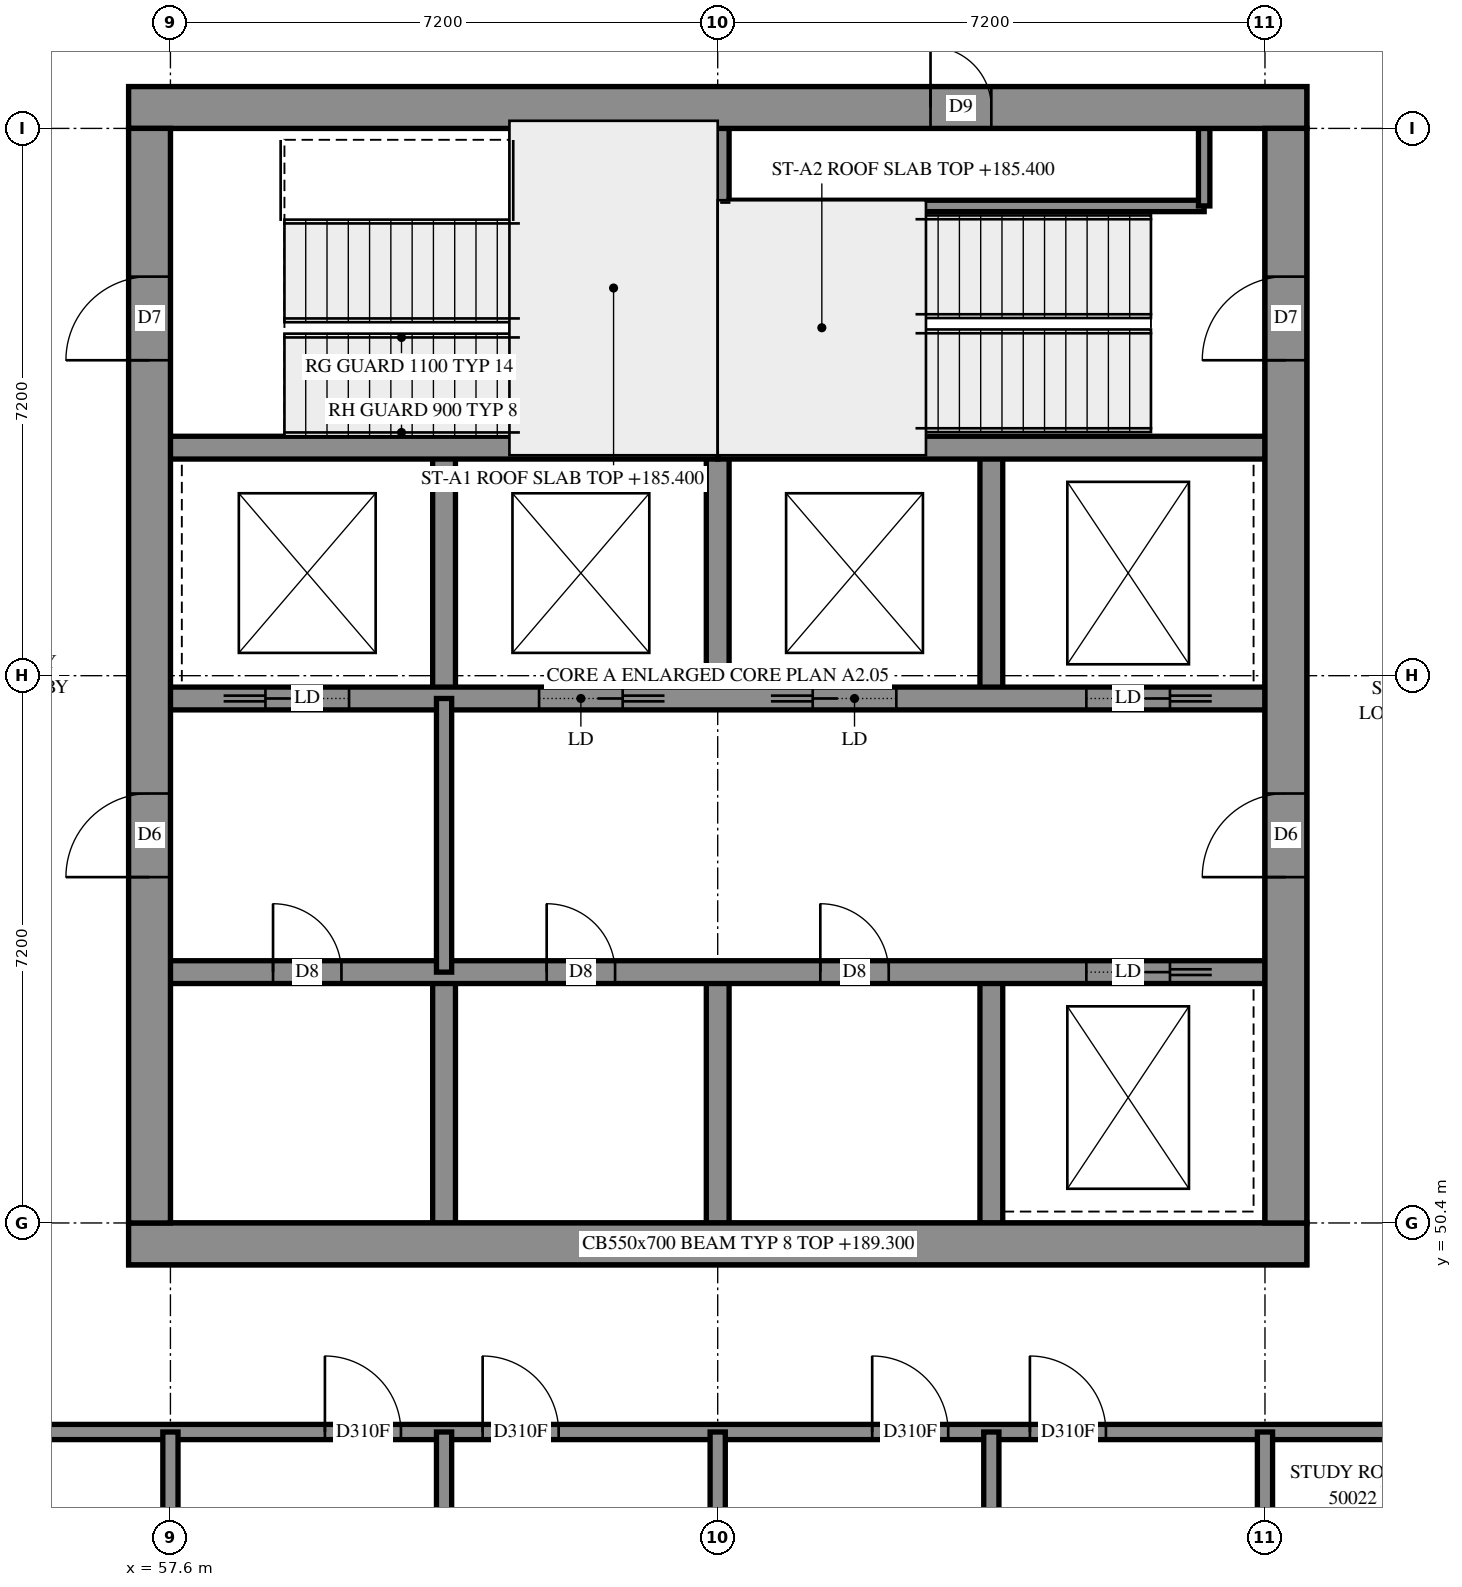
"""IFC4 building model, lengths in metres.
Left out: names, types, materials, properties, quantities, classifications, styles, units other than length and angle.
Written with IfcOpenShell. Run it as: python <this file> out.ifc"""

import sys

from ifc_helpers import new_model, si_unit, direction, frame, frame_2d, origin, place, context, subcontext, project, spatial, rectangle, extrude, element, fill, save


model = new_model("IFC4")
c1 = context("Model", 3, precision=1e-05, world=origin(), true_north=direction((0.0, 1.0)))
c2 = subcontext(c1, "Body", "Model", "MODEL_VIEW")
j1 = project(units=[si_unit("LENGTHUNIT", "METRE"), si_unit("PLANEANGLEUNIT", "RADIAN")], contexts=[c1])
p1 = place(None, origin())
s1 = spatial("IfcSite", under=j1, at=p1, CompositionType="ELEMENT")
p2 = place(p1, origin())
s2 = spatial("IfcBuilding", under=s1, at=p2, CompositionType="ELEMENT")
p3 = place(p2, frame((0.0, 0.0, 185.4)))
s3 = spatial("IfcBuildingStorey", under=s2, at=p3, CompositionType="ELEMENT", Elevation=185.4)
p4 = place(p3, frame((57.05, 50.125, -0.3), z_axis=(0.0, 0.0, 1.0), x_axis=(1.0, 0.0, 0.0)))
e1 = element("IfcWall", 1, at=p4, inside=s3, PredefinedType="SHEAR", context=c2, shape_type="SweptSolid", body=[
    extrude(rectangle(XDim=15.5, YDim=0.55, at=frame_2d((7.75, 0.0))), origin(), (0.0, 0.0, 1.0), 3.5),
])
p5 = place(p3, frame((57.05, 65.075, -0.3), z_axis=(0.0, 0.0, 1.0), x_axis=(1.0, 0.0, 0.0)))
e2 = element("IfcWall", 2, at=p5, inside=s3, PredefinedType="SHEAR", context=c2, shape_type="SweptSolid", body=[
    extrude(rectangle(XDim=15.5, YDim=0.55, at=frame_2d((7.75, 0.0))), origin(), (0.0, 0.0, 1.0), 3.5),
])
p6 = place(p5, frame((10.55, 0.0, 0.3)))
e3 = element("IfcOpeningElement", 3, at=p6, cuts=e2, PredefinedType="OPENING", context=c2, shape_type="SweptSolid", body=[
    extrude(rectangle(XDim=0.8, YDim=2.1, at=frame_2d((0.4, 1.05))), frame((0.0, 0.285, 0.0), z_axis=(0.0, -1.0, 0.0), x_axis=(1.0, 0.0, 0.0)), (0.0, 0.0, 1.0), 0.57),
])
p7 = place(p3, frame((57.325, 50.4, -0.3), z_axis=(0.0, 0.0, 1.0), x_axis=(0.0, 1.0, 0.0)))
e4 = element("IfcWall", 4, at=p7, inside=s3, PredefinedType="SHEAR", context=c2, shape_type="SweptSolid", body=[
    extrude(rectangle(XDim=14.4, YDim=0.55, at=frame_2d((7.2, 0.0))), origin(), (0.0, 0.0, 1.0), 3.5),
])
p8 = place(p7, frame((4.55, 0.0, 0.3)))
e5 = element("IfcOpeningElement", 5, at=p8, cuts=e4, PredefinedType="OPENING", context=c2, shape_type="SweptSolid", body=[
    extrude(rectangle(XDim=1.1, YDim=2.1, at=frame_2d((0.55, 1.05))), frame((0.0, 0.285, 0.0), z_axis=(0.0, -1.0, 0.0), x_axis=(1.0, 0.0, 0.0)), (0.0, 0.0, 1.0), 0.57),
])
p9 = place(p7, frame((11.35, 0.0, 0.3)))
e6 = element("IfcOpeningElement", 6, at=p9, cuts=e4, PredefinedType="OPENING", context=c2, shape_type="SweptSolid", body=[
    extrude(rectangle(XDim=1.1, YDim=2.1, at=frame_2d((0.55, 1.05))), frame((0.0, 0.285, 0.0), z_axis=(0.0, -1.0, 0.0), x_axis=(1.0, 0.0, 0.0)), (0.0, 0.0, 1.0), 0.57),
])
p10 = place(p3, frame((72.275, 50.4, -0.3), z_axis=(0.0, 0.0, 1.0), x_axis=(0.0, 1.0, 0.0)))
e7 = element("IfcWall", 7, at=p10, inside=s3, PredefinedType="SHEAR", context=c2, shape_type="SweptSolid", body=[
    extrude(rectangle(XDim=14.4, YDim=0.55, at=frame_2d((7.2, 0.0))), origin(), (0.0, 0.0, 1.0), 3.5),
])
p11 = place(p10, frame((4.55, 0.0, 0.3)))
e8 = element("IfcOpeningElement", 8, at=p11, cuts=e7, PredefinedType="OPENING", context=c2, shape_type="SweptSolid", body=[
    extrude(rectangle(XDim=1.1, YDim=2.1, at=frame_2d((0.55, 1.05))), frame((0.0, 0.285, 0.0), z_axis=(0.0, -1.0, 0.0), x_axis=(1.0, 0.0, 0.0)), (0.0, 0.0, 1.0), 0.57),
])
p12 = place(p10, frame((11.35, 0.0, 0.3)))
e9 = element("IfcOpeningElement", 9, at=p12, cuts=e7, PredefinedType="OPENING", context=c2, shape_type="SweptSolid", body=[
    extrude(rectangle(XDim=1.1, YDim=2.1, at=frame_2d((0.55, 1.05))), frame((0.0, 0.285, 0.0), z_axis=(0.0, -1.0, 0.0), x_axis=(1.0, 0.0, 0.0)), (0.0, 0.0, 1.0), 0.57),
])
for number, where, z_axis, x_axis in (
    (10, (61.2, 50.4, 0.0), (0.0, 0.0, 1.0), (0.0, 1.0, 0.0)),
    (11, (61.2, 57.3, 0.0), (0.0, 0.0, 1.0), (0.0, 1.0, 0.0)),
    (12, (64.8, 50.4, 0.0), (0.0, 0.0, 1.0), (0.0, 1.0, 0.0)),
    (13, (64.8, 57.3, 0.0), (0.0, 0.0, 1.0), (0.0, 1.0, 0.0)),
    (14, (68.4, 50.4, 0.0), (0.0, 0.0, 1.0), (0.0, 1.0, 0.0)),
    (15, (68.4, 57.3, 0.0), (0.0, 0.0, 1.0), (0.0, 1.0, 0.0)),
):
    element("IfcWall", number, at=place(p3, frame(where, z_axis=z_axis, x_axis=x_axis)), inside=s3, PredefinedType="SOLIDWALL", context=c2, shape_type="SweptSolid", body=[
        extrude(rectangle(XDim=3.3, YDim=0.3, at=frame_2d((1.65, 0.0))), origin(), (0.0, 0.0, 1.0), 3.9),
    ])
p13 = place(p3, frame((57.6, 53.7, 0.0), z_axis=(0.0, 0.0, 1.0), x_axis=(1.0, 0.0, 0.0)))
e16 = element("IfcWall", 16, at=p13, inside=s3, PredefinedType="SOLIDWALL", context=c2, shape_type="SweptSolid", body=[
    extrude(rectangle(XDim=14.4, YDim=0.3, at=frame_2d((7.2, 0.0))), origin(), (0.0, 0.0, 1.0), 3.9),
])
p14 = place(p13, frame((1.35, 0.0, 0.0)))
e17 = element("IfcOpeningElement", 17, at=p14, cuts=e16, PredefinedType="OPENING", context=c2, shape_type="SweptSolid", body=[
    extrude(rectangle(XDim=0.9, YDim=2.1, at=frame_2d((0.45, 1.05))), frame((0.0, 0.16, 0.0), z_axis=(0.0, -1.0, 0.0), x_axis=(1.0, 0.0, 0.0)), (0.0, 0.0, 1.0), 0.32),
])
p15 = place(p13, frame((4.95, 0.0, 0.0)))
e18 = element("IfcOpeningElement", 18, at=p15, cuts=e16, PredefinedType="OPENING", context=c2, shape_type="SweptSolid", body=[
    extrude(rectangle(XDim=0.9, YDim=2.1, at=frame_2d((0.45, 1.05))), frame((0.0, 0.16, 0.0), z_axis=(0.0, -1.0, 0.0), x_axis=(1.0, 0.0, 0.0)), (0.0, 0.0, 1.0), 0.32),
])
p16 = place(p13, frame((8.55, 0.0, 0.0)))
e19 = element("IfcOpeningElement", 19, at=p16, cuts=e16, PredefinedType="OPENING", context=c2, shape_type="SweptSolid", body=[
    extrude(rectangle(XDim=0.9, YDim=2.1, at=frame_2d((0.45, 1.05))), frame((0.0, 0.16, 0.0), z_axis=(0.0, -1.0, 0.0), x_axis=(1.0, 0.0, 0.0)), (0.0, 0.0, 1.0), 0.32),
])
p17 = place(p13, frame((12.05, 0.0, 0.0)))
e20 = element("IfcOpeningElement", 20, at=p17, cuts=e16, PredefinedType="OPENING", context=c2, shape_type="SweptSolid", body=[
    extrude(rectangle(XDim=1.1, YDim=2.1, at=frame_2d((0.55, 1.05))), frame((0.0, 0.16, 0.0), z_axis=(0.0, -1.0, 0.0), x_axis=(1.0, 0.0, 0.0)), (0.0, 0.0, 1.0), 0.32),
])
p18 = place(p3, frame((57.6, 57.3, 0.0), z_axis=(0.0, 0.0, 1.0), x_axis=(1.0, 0.0, 0.0)))
e21 = element("IfcWall", 21, at=p18, inside=s3, PredefinedType="SOLIDWALL", context=c2, shape_type="SweptSolid", body=[
    extrude(rectangle(XDim=14.4, YDim=0.3, at=frame_2d((7.2, 0.0))), origin(), (0.0, 0.0, 1.0), 3.9),
])
p19 = place(p18, frame((1.25, 0.0, 0.0)))
e22 = element("IfcOpeningElement", 22, at=p19, cuts=e21, PredefinedType="OPENING", context=c2, shape_type="SweptSolid", body=[
    extrude(rectangle(XDim=1.1, YDim=2.1, at=frame_2d((0.55, 1.05))), frame((0.0, 0.16, 0.0), z_axis=(0.0, -1.0, 0.0), x_axis=(1.0, 0.0, 0.0)), (0.0, 0.0, 1.0), 0.32),
])
p20 = place(p18, frame((4.85, 0.0, 0.0)))
e23 = element("IfcOpeningElement", 23, at=p20, cuts=e21, PredefinedType="OPENING", context=c2, shape_type="SweptSolid", body=[
    extrude(rectangle(XDim=1.1, YDim=2.1, at=frame_2d((0.55, 1.05))), frame((0.0, 0.16, 0.0), z_axis=(0.0, -1.0, 0.0), x_axis=(1.0, 0.0, 0.0)), (0.0, 0.0, 1.0), 0.32),
])
p21 = place(p18, frame((8.45, 0.0, 0.0)))
e24 = element("IfcOpeningElement", 24, at=p21, cuts=e21, PredefinedType="OPENING", context=c2, shape_type="SweptSolid", body=[
    extrude(rectangle(XDim=1.1, YDim=2.1, at=frame_2d((0.55, 1.05))), frame((0.0, 0.16, 0.0), z_axis=(0.0, -1.0, 0.0), x_axis=(1.0, 0.0, 0.0)), (0.0, 0.0, 1.0), 0.32),
])
p22 = place(p18, frame((12.05, 0.0, 0.0)))
e25 = element("IfcOpeningElement", 25, at=p22, cuts=e21, PredefinedType="OPENING", context=c2, shape_type="SweptSolid", body=[
    extrude(rectangle(XDim=1.1, YDim=2.1, at=frame_2d((0.55, 1.05))), frame((0.0, 0.16, 0.0), z_axis=(0.0, -1.0, 0.0), x_axis=(1.0, 0.0, 0.0)), (0.0, 0.0, 1.0), 0.32),
])
for number, where, z_axis, x_axis in (
    (26, (57.6, 60.6, 0.0), (0.0, 0.0, 1.0), (1.0, 0.0, 0.0)),
    (27, (64.8, 60.6, 0.0), (0.0, 0.0, 1.0), (1.0, 0.0, 0.0)),
):
    element("IfcWall", number, at=place(p3, frame(where, z_axis=z_axis, x_axis=x_axis)), inside=s3, PredefinedType="SOLIDWALL", context=c2, shape_type="SweptSolid", body=[
        extrude(rectangle(XDim=7.2, YDim=0.3, at=frame_2d((3.6, 0.0))), origin(), (0.0, 0.0, 1.0), 3.9),
    ])
p23 = place(p3, frame((64.8, 60.6, 0.0), z_axis=(0.0, 0.0, 1.0), x_axis=(0.0, 1.0, 0.0)))
e28 = element("IfcWall", 28, at=p23, inside=s3, PredefinedType="SOLIDWALL", context=c2, shape_type="SweptSolid", body=[
    extrude(rectangle(XDim=4.2, YDim=0.3, at=frame_2d((2.1, 0.0))), origin(), (0.0, 0.0, 1.0), 3.9),
])
p24 = place(p3, frame((64.95, 63.78, 0.0), z_axis=(0.0, 0.0, 1.0), x_axis=(1.0, 0.0, 0.0)))
e29 = element("IfcWall", 29, at=p24, inside=s3, PredefinedType="PARTITIONING", context=c2, shape_type="SweptSolid", body=[
    extrude(rectangle(XDim=6.25, YDim=0.15, at=frame_2d((3.125, 0.0))), origin(), (0.0, 0.0, 1.0), 3.9),
])
p25 = place(p3, frame((71.2, 63.78, 0.0), z_axis=(0.0, 0.0, 1.0), x_axis=(0.0, 1.0, 0.0)))
e30 = element("IfcWall", 30, at=p25, inside=s3, PredefinedType="PARTITIONING", context=c2, shape_type="SweptSolid", body=[
    extrude(rectangle(XDim=1.02, YDim=0.15, at=frame_2d((0.51, 0.0))), origin(), (0.0, 0.0, 1.0), 3.9),
])
p26 = place(p3, frame((61.2, 53.7, 0.0), z_axis=(0.0, 0.0, 1.0), x_axis=(0.0, 1.0, 0.0)))
e31 = element("IfcWall", 31, at=p26, inside=s3, PredefinedType="PARTITIONING", context=c2, shape_type="SweptSolid", body=[
    extrude(rectangle(XDim=3.6, YDim=0.2, at=frame_2d((1.8, 0.0))), origin(), (0.0, 0.0, 1.0), 3.9),
])
p27 = place(p3, frame((54.85, 47.65, 0.0), z_axis=(0.0, 0.0, 1.0), x_axis=(1.0, 0.0, 0.0)))
e32 = element("IfcWall", 32, at=p27, inside=s3, PredefinedType="PARTITIONING", context=c2, shape_type="SweptSolid", body=[
    extrude(rectangle(XDim=19.354, YDim=0.2, at=frame_2d((9.677, 0.0))), origin(), (0.0, 0.0, 1.0), 3.9),
])
p28 = place(p27, frame((4.782, 0.0, 0.0)))
e33 = element("IfcOpeningElement", 33, at=p28, cuts=e32, PredefinedType="OPENING", context=c2, shape_type="SweptSolid", body=[
    extrude(rectangle(XDim=1.0, YDim=2.1, at=frame_2d((0.5, 1.05))), frame((0.0, 0.11, 0.0), z_axis=(0.0, -1.0, 0.0), x_axis=(1.0, 0.0, 0.0)), (0.0, 0.0, 1.0), 0.22),
])
p29 = place(p27, frame((6.857, 0.0, 0.0)))
e34 = element("IfcOpeningElement", 34, at=p29, cuts=e32, PredefinedType="OPENING", context=c2, shape_type="SweptSolid", body=[
    extrude(rectangle(XDim=1.0, YDim=2.1, at=frame_2d((0.5, 1.05))), frame((0.0, 0.11, 0.0), z_axis=(0.0, -1.0, 0.0), x_axis=(1.0, 0.0, 0.0)), (0.0, 0.0, 1.0), 0.22),
])
p30 = place(p27, frame((11.982, 0.0, 0.0)))
e35 = element("IfcOpeningElement", 35, at=p30, cuts=e32, PredefinedType="OPENING", context=c2, shape_type="SweptSolid", body=[
    extrude(rectangle(XDim=1.0, YDim=2.1, at=frame_2d((0.5, 1.05))), frame((0.0, 0.11, 0.0), z_axis=(0.0, -1.0, 0.0), x_axis=(1.0, 0.0, 0.0)), (0.0, 0.0, 1.0), 0.22),
])
p31 = place(p27, frame((14.057, 0.0, 0.0)))
e36 = element("IfcOpeningElement", 36, at=p31, cuts=e32, PredefinedType="OPENING", context=c2, shape_type="SweptSolid", body=[
    extrude(rectangle(XDim=1.0, YDim=2.1, at=frame_2d((0.5, 1.05))), frame((0.0, 0.11, 0.0), z_axis=(0.0, -1.0, 0.0), x_axis=(1.0, 0.0, 0.0)), (0.0, 0.0, 1.0), 0.22),
])
for number, where, z_axis, x_axis in (
    (37, (57.6, 45.13, 0.0), (0.0, 0.0, 1.0), (0.0, 1.0, 0.0)),
    (38, (61.2, 45.13, 0.0), (0.0, 0.0, 1.0), (0.0, 1.0, 0.0)),
    (39, (64.8, 45.13, 0.0), (0.0, 0.0, 1.0), (0.0, 1.0, 0.0)),
    (40, (68.4, 45.13, 0.0), (0.0, 0.0, 1.0), (0.0, 1.0, 0.0)),
    (41, (72.0, 45.13, 0.0), (0.0, 0.0, 1.0), (0.0, 1.0, 0.0)),
):
    element("IfcWall", number, at=place(p3, frame(where, z_axis=z_axis, x_axis=x_axis)), inside=s3, PredefinedType="PARTITIONING", context=c2, shape_type="SweptSolid", body=[
        extrude(rectangle(XDim=2.52, YDim=0.2, at=frame_2d((1.26, 0.0))), origin(), (0.0, 0.0, 1.0), 3.9),
    ])
p32 = place(p6, origin())
e42 = element("IfcDoor", 42, at=p32, inside=s3, OperationType="SINGLE_SWING_RIGHT", PredefinedType="DOOR", context=c2, shape_type="SweptSolid", body=[
    extrude(rectangle(XDim=0.8, YDim=2.1, at=frame_2d((0.4, 1.05))), frame((0.0, 0.025, 0.0), z_axis=(0.0, -1.0, 0.0), x_axis=(1.0, 0.0, 0.0)), (0.0, 0.0, 1.0), 0.05),
])
fill(e3, e42)
p33 = place(p8, origin())
e43 = element("IfcDoor", 43, at=p33, inside=s3, OperationType="DOUBLE_DOOR_SINGLE_SWING", PredefinedType="DOOR", context=c2, shape_type="SweptSolid", body=[
    extrude(rectangle(XDim=1.1, YDim=2.1, at=frame_2d((0.55, 1.05))), frame((0.0, 0.025, 0.0), z_axis=(0.0, -1.0, 0.0), x_axis=(1.0, 0.0, 0.0)), (0.0, 0.0, 1.0), 0.05),
])
fill(e5, e43)
p34 = place(p11, origin())
e44 = element("IfcDoor", 44, at=p34, inside=s3, OperationType="DOUBLE_DOOR_SINGLE_SWING", PredefinedType="DOOR", context=c2, shape_type="SweptSolid", body=[
    extrude(rectangle(XDim=1.1, YDim=2.1, at=frame_2d((0.55, 1.05))), frame((0.0, 0.025, 0.0), z_axis=(0.0, -1.0, 0.0), x_axis=(1.0, 0.0, 0.0)), (0.0, 0.0, 1.0), 0.05),
])
fill(e8, e44)
p35 = place(p9, origin())
e45 = element("IfcDoor", 45, at=p35, inside=s3, OperationType="SINGLE_SWING_LEFT", PredefinedType="DOOR", context=c2, shape_type="SweptSolid", body=[
    extrude(rectangle(XDim=1.1, YDim=2.1, at=frame_2d((0.55, 1.05))), frame((0.0, 0.025, 0.0), z_axis=(0.0, -1.0, 0.0), x_axis=(1.0, 0.0, 0.0)), (0.0, 0.0, 1.0), 0.05),
])
fill(e6, e45)
p36 = place(p12, origin())
e46 = element("IfcDoor", 46, at=p36, inside=s3, OperationType="SINGLE_SWING_RIGHT", PredefinedType="DOOR", context=c2, shape_type="SweptSolid", body=[
    extrude(rectangle(XDim=1.1, YDim=2.1, at=frame_2d((0.55, 1.05))), frame((0.0, 0.025, 0.0), z_axis=(0.0, -1.0, 0.0), x_axis=(1.0, 0.0, 0.0)), (0.0, 0.0, 1.0), 0.05),
])
fill(e9, e46)
p37 = place(p14, origin())
e47 = element("IfcDoor", 47, at=p37, inside=s3, OperationType="SINGLE_SWING_LEFT", PredefinedType="DOOR", context=c2, shape_type="SweptSolid", body=[
    extrude(rectangle(XDim=0.9, YDim=2.1, at=frame_2d((0.45, 1.05))), frame((0.0, 0.025, 0.0), z_axis=(0.0, -1.0, 0.0), x_axis=(1.0, 0.0, 0.0)), (0.0, 0.0, 1.0), 0.05),
])
fill(e17, e47)
p38 = place(p15, origin())
e48 = element("IfcDoor", 48, at=p38, inside=s3, OperationType="SINGLE_SWING_LEFT", PredefinedType="DOOR", context=c2, shape_type="SweptSolid", body=[
    extrude(rectangle(XDim=0.9, YDim=2.1, at=frame_2d((0.45, 1.05))), frame((0.0, 0.025, 0.0), z_axis=(0.0, -1.0, 0.0), x_axis=(1.0, 0.0, 0.0)), (0.0, 0.0, 1.0), 0.05),
])
fill(e18, e48)
p39 = place(p16, origin())
e49 = element("IfcDoor", 49, at=p39, inside=s3, OperationType="SINGLE_SWING_LEFT", PredefinedType="DOOR", context=c2, shape_type="SweptSolid", body=[
    extrude(rectangle(XDim=0.9, YDim=2.1, at=frame_2d((0.45, 1.05))), frame((0.0, 0.025, 0.0), z_axis=(0.0, -1.0, 0.0), x_axis=(1.0, 0.0, 0.0)), (0.0, 0.0, 1.0), 0.05),
])
fill(e19, e49)
p40 = place(p17, origin())
e50 = element("IfcDoor", 50, at=p40, inside=s3, OperationType="SLIDING_TO_RIGHT", PredefinedType="DOOR", context=c2, shape_type="SweptSolid", body=[
    extrude(rectangle(XDim=1.1, YDim=2.1, at=frame_2d((0.55, 1.05))), frame((0.0, 0.025, 0.0), z_axis=(0.0, -1.0, 0.0), x_axis=(1.0, 0.0, 0.0)), (0.0, 0.0, 1.0), 0.05),
])
fill(e20, e50)
p41 = place(p19, origin())
e51 = element("IfcDoor", 51, at=p41, inside=s3, OperationType="SLIDING_TO_LEFT", PredefinedType="DOOR", context=c2, shape_type="SweptSolid", body=[
    extrude(rectangle(XDim=1.1, YDim=2.1, at=frame_2d((0.55, 1.05))), frame((0.0, 0.025, 0.0), z_axis=(0.0, -1.0, 0.0), x_axis=(1.0, 0.0, 0.0)), (0.0, 0.0, 1.0), 0.05),
])
fill(e22, e51)
p42 = place(p20, origin())
e52 = element("IfcDoor", 52, at=p42, inside=s3, OperationType="SLIDING_TO_RIGHT", PredefinedType="DOOR", context=c2, shape_type="SweptSolid", body=[
    extrude(rectangle(XDim=1.1, YDim=2.1, at=frame_2d((0.55, 1.05))), frame((0.0, 0.025, 0.0), z_axis=(0.0, -1.0, 0.0), x_axis=(1.0, 0.0, 0.0)), (0.0, 0.0, 1.0), 0.05),
])
fill(e23, e52)
p43 = place(p21, origin())
e53 = element("IfcDoor", 53, at=p43, inside=s3, OperationType="SLIDING_TO_LEFT", PredefinedType="DOOR", context=c2, shape_type="SweptSolid", body=[
    extrude(rectangle(XDim=1.1, YDim=2.1, at=frame_2d((0.55, 1.05))), frame((0.0, 0.025, 0.0), z_axis=(0.0, -1.0, 0.0), x_axis=(1.0, 0.0, 0.0)), (0.0, 0.0, 1.0), 0.05),
])
fill(e24, e53)
p44 = place(p22, origin())
e54 = element("IfcDoor", 54, at=p44, inside=s3, OperationType="SLIDING_TO_RIGHT", PredefinedType="DOOR", context=c2, shape_type="SweptSolid", body=[
    extrude(rectangle(XDim=1.1, YDim=2.1, at=frame_2d((0.55, 1.05))), frame((0.0, 0.025, 0.0), z_axis=(0.0, -1.0, 0.0), x_axis=(1.0, 0.0, 0.0)), (0.0, 0.0, 1.0), 0.05),
])
fill(e25, e54)
p45 = place(p28, origin())
e55 = element("IfcDoor", 55, at=p45, inside=s3, OperationType="SINGLE_SWING_LEFT", PredefinedType="DOOR", context=c2, shape_type="SweptSolid", body=[
    extrude(rectangle(XDim=1.0, YDim=2.1, at=frame_2d((0.5, 1.05))), frame((0.0, 0.025, 0.0), z_axis=(0.0, -1.0, 0.0), x_axis=(1.0, 0.0, 0.0)), (0.0, 0.0, 1.0), 0.05),
])
fill(e33, e55)
p46 = place(p29, origin())
e56 = element("IfcDoor", 56, at=p46, inside=s3, OperationType="SINGLE_SWING_RIGHT", PredefinedType="DOOR", context=c2, shape_type="SweptSolid", body=[
    extrude(rectangle(XDim=1.0, YDim=2.1, at=frame_2d((0.5, 1.05))), frame((0.0, 0.025, 0.0), z_axis=(0.0, -1.0, 0.0), x_axis=(1.0, 0.0, 0.0)), (0.0, 0.0, 1.0), 0.05),
])
fill(e34, e56)
p47 = place(p30, origin())
e57 = element("IfcDoor", 57, at=p47, inside=s3, OperationType="SINGLE_SWING_LEFT", PredefinedType="DOOR", context=c2, shape_type="SweptSolid", body=[
    extrude(rectangle(XDim=1.0, YDim=2.1, at=frame_2d((0.5, 1.05))), frame((0.0, 0.025, 0.0), z_axis=(0.0, -1.0, 0.0), x_axis=(1.0, 0.0, 0.0)), (0.0, 0.0, 1.0), 0.05),
])
fill(e35, e57)
p48 = place(p31, origin())
e58 = element("IfcDoor", 58, at=p48, inside=s3, OperationType="SINGLE_SWING_RIGHT", PredefinedType="DOOR", context=c2, shape_type="SweptSolid", body=[
    extrude(rectangle(XDim=1.0, YDim=2.1, at=frame_2d((0.5, 1.05))), frame((0.0, 0.025, 0.0), z_axis=(0.0, -1.0, 0.0), x_axis=(1.0, 0.0, 0.0)), (0.0, 0.0, 1.0), 0.05),
])
fill(e36, e58)
save(model, sys.argv[1])
